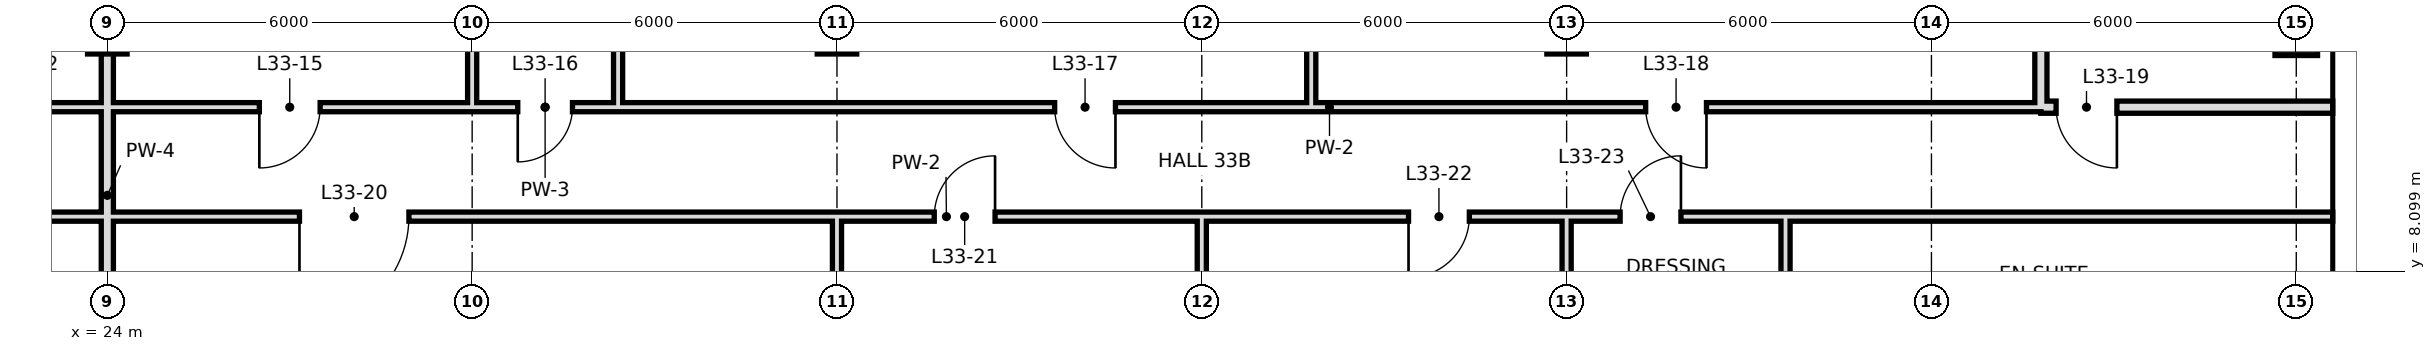
"""IFC4 building model, lengths in metres.
Left out: names, types, materials, properties, quantities, classifications, styles, units other than length and angle.
Written with IfcOpenShell. Run it as: python <this file> out.ifc"""

import sys

from ifc_helpers import new_model, si_unit, direction, frame, frame_2d, origin, origin_2d, place, context, subcontext, project, spatial, rectangle, hollow_rectangle, extrude, element, fill, save


model = new_model("IFC4")
c1 = context("Model", 3, precision=1e-05, world=origin(), true_north=direction((0.0, 1.0)))
c2 = subcontext(c1, "Body", "Model", "MODEL_VIEW")
j1 = project(units=[si_unit("LENGTHUNIT", "METRE"), si_unit("PLANEANGLEUNIT", "RADIAN")], contexts=[c1])
p1 = place(None, origin())
s1 = spatial("IfcSite", under=j1, at=p1, CompositionType="ELEMENT")
p2 = place(p1, origin())
s2 = spatial("IfcBuilding", under=s1, at=p2, CompositionType="ELEMENT")
p3 = place(p2, frame((0.0, 0.0, 147.4)))
s3 = spatial("IfcBuildingStorey", under=s2, at=p3, CompositionType="ELEMENT", Elevation=147.4)
for number, where, z_axis, x_axis in (
    (1, (24.0, 12.0, 0.0), (0.0, 0.0, 1.0), (1.0, 0.0, 0.0)),
    (2, (36.0, 12.0, 0.0), (0.0, 0.0, 1.0), (1.0, 0.0, 0.0)),
    (3, (48.0, 12.0, 0.0), (0.0, 0.0, 1.0), (1.0, 0.0, 0.0)),
):
    element("IfcColumn", number, at=place(p3, frame(where, z_axis=z_axis, x_axis=x_axis)), inside=s3, PredefinedType="COLUMN", context=c2, shape_type="SweptSolid", body=[
        extrude(hollow_rectangle(XDim=0.65, YDim=0.65, WallThickness=0.032, at=origin_2d()), origin(), (0.0, 0.0, 1.0), 3.6),
    ])
p4 = place(p3, frame((60.0, 12.0, 0.0), z_axis=(0.0, 0.0, 1.0), x_axis=(1.0, 0.0, 0.0)))
e4 = element("IfcColumn", 4, at=p4, inside=s3, PredefinedType="COLUMN", context=c2, shape_type="SweptSolid", body=[
    extrude(hollow_rectangle(XDim=0.7, YDim=0.7, WallThickness=0.036, at=origin_2d()), origin(), (0.0, 0.0, 1.0), 3.6),
])
p5 = place(p3, frame((24.0, 0.0, 0.0), z_axis=(0.0, 0.0, 1.0), x_axis=(0.0, 1.0, 0.0)))
e5 = element("IfcWall", 5, at=p5, inside=s3, PredefinedType="SOLIDWALL", context=c2, shape_type="SweptSolid", body=[
    extrude(rectangle(XDim=18.7, YDim=0.2, at=frame_2d((9.35, 0.0))), origin(), (0.0, 0.0, 1.0), 2.72),
])
p6 = place(p3, frame((30.0, 10.8, 0.0), z_axis=(0.0, 0.0, 1.0), x_axis=(0.0, 1.0, 0.0)))
e6 = element("IfcWall", 6, at=p6, inside=s3, PredefinedType="PARTITIONING", context=c2, shape_type="SweptSolid", body=[
    extrude(rectangle(XDim=7.9, YDim=0.15, at=frame_2d((3.95, 0.0))), origin(), (0.0, 0.0, 1.0), 2.72),
])
p7 = place(p3, frame((32.4, 10.8, 0.0), z_axis=(0.0, 0.0, 1.0), x_axis=(0.0, 1.0, 0.0)))
e7 = element("IfcWall", 7, at=p7, inside=s3, PredefinedType="PARTITIONING", context=c2, shape_type="SweptSolid", body=[
    extrude(rectangle(XDim=7.9, YDim=0.15, at=frame_2d((3.95, 0.0))), origin(), (0.0, 0.0, 1.0), 3.42),
])
p8 = place(p3, frame((36.0, 0.0, 0.0), z_axis=(0.0, 0.0, 1.0), x_axis=(0.0, 1.0, 0.0)))
e8 = element("IfcWall", 8, at=p8, inside=s3, PredefinedType="PARTITIONING", context=c2, shape_type="SweptSolid", body=[
    extrude(rectangle(XDim=9.0, YDim=0.15, at=frame_2d((4.5, 0.0))), origin(), (0.0, 0.0, 1.0), 2.72),
])
p9 = place(p3, frame((42.0, -0.6, 0.0), z_axis=(0.0, 0.0, 1.0), x_axis=(0.0, 1.0, 0.0)))
e9 = element("IfcWall", 9, at=p9, inside=s3, PredefinedType="PARTITIONING", context=c2, shape_type="SweptSolid", body=[
    extrude(rectangle(XDim=9.6, YDim=0.15, at=frame_2d((4.8, 0.0))), origin(), (0.0, 0.0, 1.0), 2.72),
])
p10 = place(p3, frame((43.8, 10.8, 0.0), z_axis=(0.0, 0.0, 1.0), x_axis=(0.0, 1.0, 0.0)))
e10 = element("IfcWall", 10, at=p10, inside=s3, PredefinedType="PARTITIONING", context=c2, shape_type="SweptSolid", body=[
    extrude(rectangle(XDim=7.9, YDim=0.15, at=frame_2d((3.95, 0.0))), origin(), (0.0, 0.0, 1.0), 3.42),
])
p11 = place(p3, frame((48.0, 0.0, 0.0), z_axis=(0.0, 0.0, 1.0), x_axis=(0.0, 1.0, 0.0)))
e11 = element("IfcWall", 11, at=p11, inside=s3, PredefinedType="PARTITIONING", context=c2, shape_type="SweptSolid", body=[
    extrude(rectangle(XDim=9.0, YDim=0.15, at=frame_2d((4.5, 0.0))), origin(), (0.0, 0.0, 1.0), 2.72),
])
p12 = place(p3, frame((51.6, 6.0, 0.0), z_axis=(0.0, 0.0, 1.0), x_axis=(0.0, 1.0, 0.0)))
e12 = element("IfcWall", 12, at=p12, inside=s3, PredefinedType="PARTITIONING", context=c2, shape_type="SweptSolid", body=[
    extrude(rectangle(XDim=3.0, YDim=0.15, at=frame_2d((1.5, 0.0))), origin(), (0.0, 0.0, 1.0), 3.42),
])
p13 = place(p3, frame((55.8, 10.8, 0.0), z_axis=(0.0, 0.0, 1.0), x_axis=(0.0, 1.0, 0.0)))
e13 = element("IfcWall", 13, at=p13, inside=s3, PredefinedType="SOLIDWALL", context=c2, shape_type="SweptSolid", body=[
    extrude(rectangle(XDim=7.2, YDim=0.2, at=frame_2d((3.6, 0.0))), origin(), (0.0, 0.0, 1.0), 2.72),
])
p14 = place(p3, frame((55.8, 10.8, 0.0), z_axis=(0.0, 0.0, 1.0), x_axis=(1.0, 0.0, 0.0)))
e14 = element("IfcWall", 14, at=p14, inside=s3, PredefinedType="SOLIDWALL", context=c2, shape_type="SweptSolid", body=[
    extrude(rectangle(XDim=4.8, YDim=0.2, at=frame_2d((2.4, 0.0))), origin(), (0.0, 0.0, 1.0), 2.97),
])
p15 = place(p14, frame((0.25, 0.0, 0.0)))
e15 = element("IfcOpeningElement", 15, at=p15, cuts=e14, PredefinedType="OPENING", context=c2, shape_type="SweptSolid", body=[
    extrude(rectangle(XDim=1.0, YDim=2.4, at=frame_2d((0.5, 1.2))), frame((0.0, 0.11, 0.0), z_axis=(0.0, -1.0, 0.0), x_axis=(1.0, 0.0, 0.0)), (0.0, 0.0, 1.0), 0.22),
])
p16 = place(p3, frame((15.6, 10.8, 0.0), z_axis=(0.0, 0.0, 1.0), x_axis=(1.0, 0.0, 0.0)))
e16 = element("IfcWall", 16, at=p16, inside=s3, PredefinedType="PARTITIONING", context=c2, shape_type="SweptSolid", body=[
    extrude(rectangle(XDim=14.4, YDim=0.15, at=frame_2d((7.2, 0.0))), origin(), (0.0, 0.0, 1.0), 3.42),
])
p17 = place(p16, frame((5.08, 0.0, 0.0)))
e17 = element("IfcOpeningElement", 17, at=p17, cuts=e16, PredefinedType="OPENING", context=c2, shape_type="SweptSolid", body=[
    extrude(rectangle(XDim=1.0, YDim=2.4, at=frame_2d((0.5, 1.2))), frame((0.0, 0.085, 0.0), z_axis=(0.0, -1.0, 0.0), x_axis=(1.0, 0.0, 0.0)), (0.0, 0.0, 1.0), 0.17),
])
p18 = place(p16, frame((10.9, 0.0, 0.0)))
e18 = element("IfcOpeningElement", 18, at=p18, cuts=e16, PredefinedType="OPENING", context=c2, shape_type="SweptSolid", body=[
    extrude(rectangle(XDim=1.0, YDim=2.4, at=frame_2d((0.5, 1.2))), frame((0.0, 0.085, 0.0), z_axis=(0.0, -1.0, 0.0), x_axis=(1.0, 0.0, 0.0)), (0.0, 0.0, 1.0), 0.17),
])
p19 = place(p3, frame((32.4, 10.8, 0.0), z_axis=(0.0, 0.0, 1.0), x_axis=(1.0, 0.0, 0.0)))
e19 = element("IfcWall", 19, at=p19, inside=s3, PredefinedType="PARTITIONING", context=c2, shape_type="SweptSolid", body=[
    extrude(rectangle(XDim=23.4, YDim=0.15, at=frame_2d((11.7, 0.0))), origin(), (0.0, 0.0, 1.0), 3.42),
])
p20 = place(p19, frame((7.18, 0.0, 0.0)))
e20 = element("IfcOpeningElement", 20, at=p20, cuts=e19, PredefinedType="OPENING", context=c2, shape_type="SweptSolid", body=[
    extrude(rectangle(XDim=1.0, YDim=2.4, at=frame_2d((0.5, 1.2))), frame((0.0, 0.085, 0.0), z_axis=(0.0, -1.0, 0.0), x_axis=(1.0, 0.0, 0.0)), (0.0, 0.0, 1.0), 0.17),
])
p21 = place(p19, frame((16.9, 0.0, 0.0)))
e21 = element("IfcOpeningElement", 21, at=p21, cuts=e19, PredefinedType="OPENING", context=c2, shape_type="SweptSolid", body=[
    extrude(rectangle(XDim=1.0, YDim=2.4, at=frame_2d((0.5, 1.2))), frame((0.0, 0.085, 0.0), z_axis=(0.0, -1.0, 0.0), x_axis=(1.0, 0.0, 0.0)), (0.0, 0.0, 1.0), 0.17),
])
p22 = place(p3, frame((30.0, 10.8, 0.0), z_axis=(0.0, 0.0, 1.0), x_axis=(1.0, 0.0, 0.0)))
e22 = element("IfcWall", 22, at=p22, inside=s3, PredefinedType="PARTITIONING", context=c2, shape_type="SweptSolid", body=[
    extrude(rectangle(XDim=2.4, YDim=0.15, at=frame_2d((1.2, 0.0))), origin(), (0.0, 0.0, 1.0), 3.42),
])
p23 = place(p22, frame((0.75, 0.0, 0.0)))
e23 = element("IfcOpeningElement", 23, at=p23, cuts=e22, PredefinedType="OPENING", context=c2, shape_type="SweptSolid", body=[
    extrude(rectangle(XDim=0.9, YDim=2.4, at=frame_2d((0.45, 1.2))), frame((0.0, 0.085, 0.0), z_axis=(0.0, -1.0, 0.0), x_axis=(1.0, 0.0, 0.0)), (0.0, 0.0, 1.0), 0.17),
])
p24 = place(p3, frame((24.0, 9.0, 0.0), z_axis=(0.0, 0.0, 1.0), x_axis=(1.0, 0.0, 0.0)))
e24 = element("IfcWall", 24, at=p24, inside=s3, PredefinedType="PARTITIONING", context=c2, shape_type="SweptSolid", body=[
    extrude(rectangle(XDim=27.6, YDim=0.15, at=frame_2d((13.8, 0.0))), origin(), (0.0, 0.0, 1.0), 3.42),
])
p25 = place(p24, frame((3.16, 0.0, 0.0)))
e25 = element("IfcOpeningElement", 25, at=p25, cuts=e24, PredefinedType="OPENING", context=c2, shape_type="SweptSolid", body=[
    extrude(rectangle(XDim=1.8, YDim=2.4, at=frame_2d((0.9, 1.2))), frame((0.0, 0.085, 0.0), z_axis=(0.0, -1.0, 0.0), x_axis=(1.0, 0.0, 0.0)), (0.0, 0.0, 1.0), 0.17),
])
p26 = place(p24, frame((13.6, 0.0, 0.0)))
e26 = element("IfcOpeningElement", 26, at=p26, cuts=e24, PredefinedType="OPENING", context=c2, shape_type="SweptSolid", body=[
    extrude(rectangle(XDim=1.0, YDim=2.4, at=frame_2d((0.5, 1.2))), frame((0.0, 0.085, 0.0), z_axis=(0.0, -1.0, 0.0), x_axis=(1.0, 0.0, 0.0)), (0.0, 0.0, 1.0), 0.17),
])
p27 = place(p24, frame((21.4, 0.0, 0.0)))
e27 = element("IfcOpeningElement", 27, at=p27, cuts=e24, PredefinedType="OPENING", context=c2, shape_type="SweptSolid", body=[
    extrude(rectangle(XDim=1.0, YDim=2.4, at=frame_2d((0.5, 1.2))), frame((0.0, 0.085, 0.0), z_axis=(0.0, -1.0, 0.0), x_axis=(1.0, 0.0, 0.0)), (0.0, 0.0, 1.0), 0.17),
])
p28 = place(p24, frame((24.88, 0.0, 0.0)))
e28 = element("IfcOpeningElement", 28, at=p28, cuts=e24, PredefinedType="OPENING", context=c2, shape_type="SweptSolid", body=[
    extrude(rectangle(XDim=1.0, YDim=2.4, at=frame_2d((0.5, 1.2))), frame((0.0, 0.085, 0.0), z_axis=(0.0, -1.0, 0.0), x_axis=(1.0, 0.0, 0.0)), (0.0, 0.0, 1.0), 0.17),
])
p29 = place(p3, frame((21.6, 9.0, 0.0), z_axis=(0.0, 0.0, 1.0), x_axis=(1.0, 0.0, 0.0)))
e29 = element("IfcWall", 29, at=p29, inside=s3, PredefinedType="PARTITIONING", context=c2, shape_type="SweptSolid", body=[
    extrude(rectangle(XDim=2.4, YDim=0.15, at=frame_2d((1.2, 0.0))), origin(), (0.0, 0.0, 1.0), 3.42),
])
p30 = place(p3, frame((51.6, 9.0, 0.0), z_axis=(0.0, 0.0, 1.0), x_axis=(1.0, 0.0, 0.0)))
e30 = element("IfcWall", 30, at=p30, inside=s3, PredefinedType="PARTITIONING", context=c2, shape_type="SweptSolid", body=[
    extrude(rectangle(XDim=9.0, YDim=0.15, at=frame_2d((4.5, 0.0))), origin(), (0.0, 0.0, 1.0), 3.42),
])
p31 = place(p18, frame((1.0, 0.0, 0.0), z_axis=(0.0, 0.0, 1.0), x_axis=(-1.0, 0.0, 0.0)))
e31 = element("IfcDoor", 31, at=p31, inside=s3, OperationType="SINGLE_SWING_RIGHT", PredefinedType="DOOR", context=c2, shape_type="SweptSolid", body=[
    extrude(rectangle(XDim=1.0, YDim=2.4, at=frame_2d((0.5, 1.2))), frame((0.0, 0.025, 0.0), z_axis=(0.0, -1.0, 0.0), x_axis=(1.0, 0.0, 0.0)), (0.0, 0.0, 1.0), 0.05),
])
fill(e18, e31)
p32 = place(p23, frame((0.9, 0.0, 0.0), z_axis=(0.0, 0.0, 1.0), x_axis=(-1.0, 0.0, 0.0)))
e32 = element("IfcDoor", 32, at=p32, inside=s3, OperationType="SINGLE_SWING_RIGHT", PredefinedType="DOOR", context=c2, shape_type="SweptSolid", body=[
    extrude(rectangle(XDim=0.9, YDim=2.4, at=frame_2d((0.45, 1.2))), frame((0.0, 0.025, 0.0), z_axis=(0.0, -1.0, 0.0), x_axis=(1.0, 0.0, 0.0)), (0.0, 0.0, 1.0), 0.05),
])
fill(e23, e32)
p33 = place(p20, origin())
e33 = element("IfcDoor", 33, at=p33, inside=s3, OperationType="SINGLE_SWING_RIGHT", PredefinedType="DOOR", context=c2, shape_type="SweptSolid", body=[
    extrude(rectangle(XDim=1.0, YDim=2.4, at=frame_2d((0.5, 1.2))), frame((0.0, 0.025, 0.0), z_axis=(0.0, -1.0, 0.0), x_axis=(1.0, 0.0, 0.0)), (0.0, 0.0, 1.0), 0.05),
])
fill(e20, e33)
p34 = place(p21, origin())
e34 = element("IfcDoor", 34, at=p34, inside=s3, OperationType="SINGLE_SWING_RIGHT", PredefinedType="DOOR", context=c2, shape_type="SweptSolid", body=[
    extrude(rectangle(XDim=1.0, YDim=2.4, at=frame_2d((0.5, 1.2))), frame((0.0, 0.025, 0.0), z_axis=(0.0, -1.0, 0.0), x_axis=(1.0, 0.0, 0.0)), (0.0, 0.0, 1.0), 0.05),
])
fill(e21, e34)
p35 = place(p15, origin())
e35 = element("IfcDoor", 35, at=p35, inside=s3, OperationType="SINGLE_SWING_RIGHT", PredefinedType="DOOR", context=c2, shape_type="SweptSolid", body=[
    extrude(rectangle(XDim=1.0, YDim=2.4, at=frame_2d((0.5, 1.2))), frame((0.0, 0.025, 0.0), z_axis=(0.0, -1.0, 0.0), x_axis=(1.0, 0.0, 0.0)), (0.0, 0.0, 1.0), 0.05),
])
fill(e15, e35)
p36 = place(p25, frame((1.8, 0.0, 0.0), z_axis=(0.0, 0.0, 1.0), x_axis=(-1.0, 0.0, 0.0)))
e36 = element("IfcDoor", 36, at=p36, inside=s3, OperationType="SINGLE_SWING_RIGHT", PredefinedType="DOOR", context=c2, shape_type="SweptSolid", body=[
    extrude(rectangle(XDim=1.8, YDim=2.4, at=frame_2d((0.9, 1.2))), frame((0.0, 0.025, 0.0), z_axis=(0.0, -1.0, 0.0), x_axis=(1.0, 0.0, 0.0)), (0.0, 0.0, 1.0), 0.05),
])
fill(e25, e36)
p37 = place(p26, frame((1.0, 0.0, 0.0), z_axis=(0.0, 0.0, 1.0), x_axis=(-1.0, 0.0, 0.0)))
e37 = element("IfcDoor", 37, at=p37, inside=s3, OperationType="SINGLE_SWING_LEFT", PredefinedType="DOOR", context=c2, shape_type="SweptSolid", body=[
    extrude(rectangle(XDim=1.0, YDim=2.4, at=frame_2d((0.5, 1.2))), frame((0.0, 0.025, 0.0), z_axis=(0.0, -1.0, 0.0), x_axis=(1.0, 0.0, 0.0)), (0.0, 0.0, 1.0), 0.05),
])
fill(e26, e37)
p38 = place(p27, frame((1.0, 0.0, 0.0), z_axis=(0.0, 0.0, 1.0), x_axis=(-1.0, 0.0, 0.0)))
e38 = element("IfcDoor", 38, at=p38, inside=s3, OperationType="SINGLE_SWING_RIGHT", PredefinedType="DOOR", context=c2, shape_type="SweptSolid", body=[
    extrude(rectangle(XDim=1.0, YDim=2.4, at=frame_2d((0.5, 1.2))), frame((0.0, 0.025, 0.0), z_axis=(0.0, -1.0, 0.0), x_axis=(1.0, 0.0, 0.0)), (0.0, 0.0, 1.0), 0.05),
])
fill(e27, e38)
p39 = place(p28, frame((1.0, 0.0, 0.0), z_axis=(0.0, 0.0, 1.0), x_axis=(-1.0, 0.0, 0.0)))
e39 = element("IfcDoor", 39, at=p39, inside=s3, OperationType="SINGLE_SWING_LEFT", PredefinedType="DOOR", context=c2, shape_type="SweptSolid", body=[
    extrude(rectangle(XDim=1.0, YDim=2.4, at=frame_2d((0.5, 1.2))), frame((0.0, 0.025, 0.0), z_axis=(0.0, -1.0, 0.0), x_axis=(1.0, 0.0, 0.0)), (0.0, 0.0, 1.0), 0.05),
])
fill(e28, e39)
save(model, sys.argv[1])
